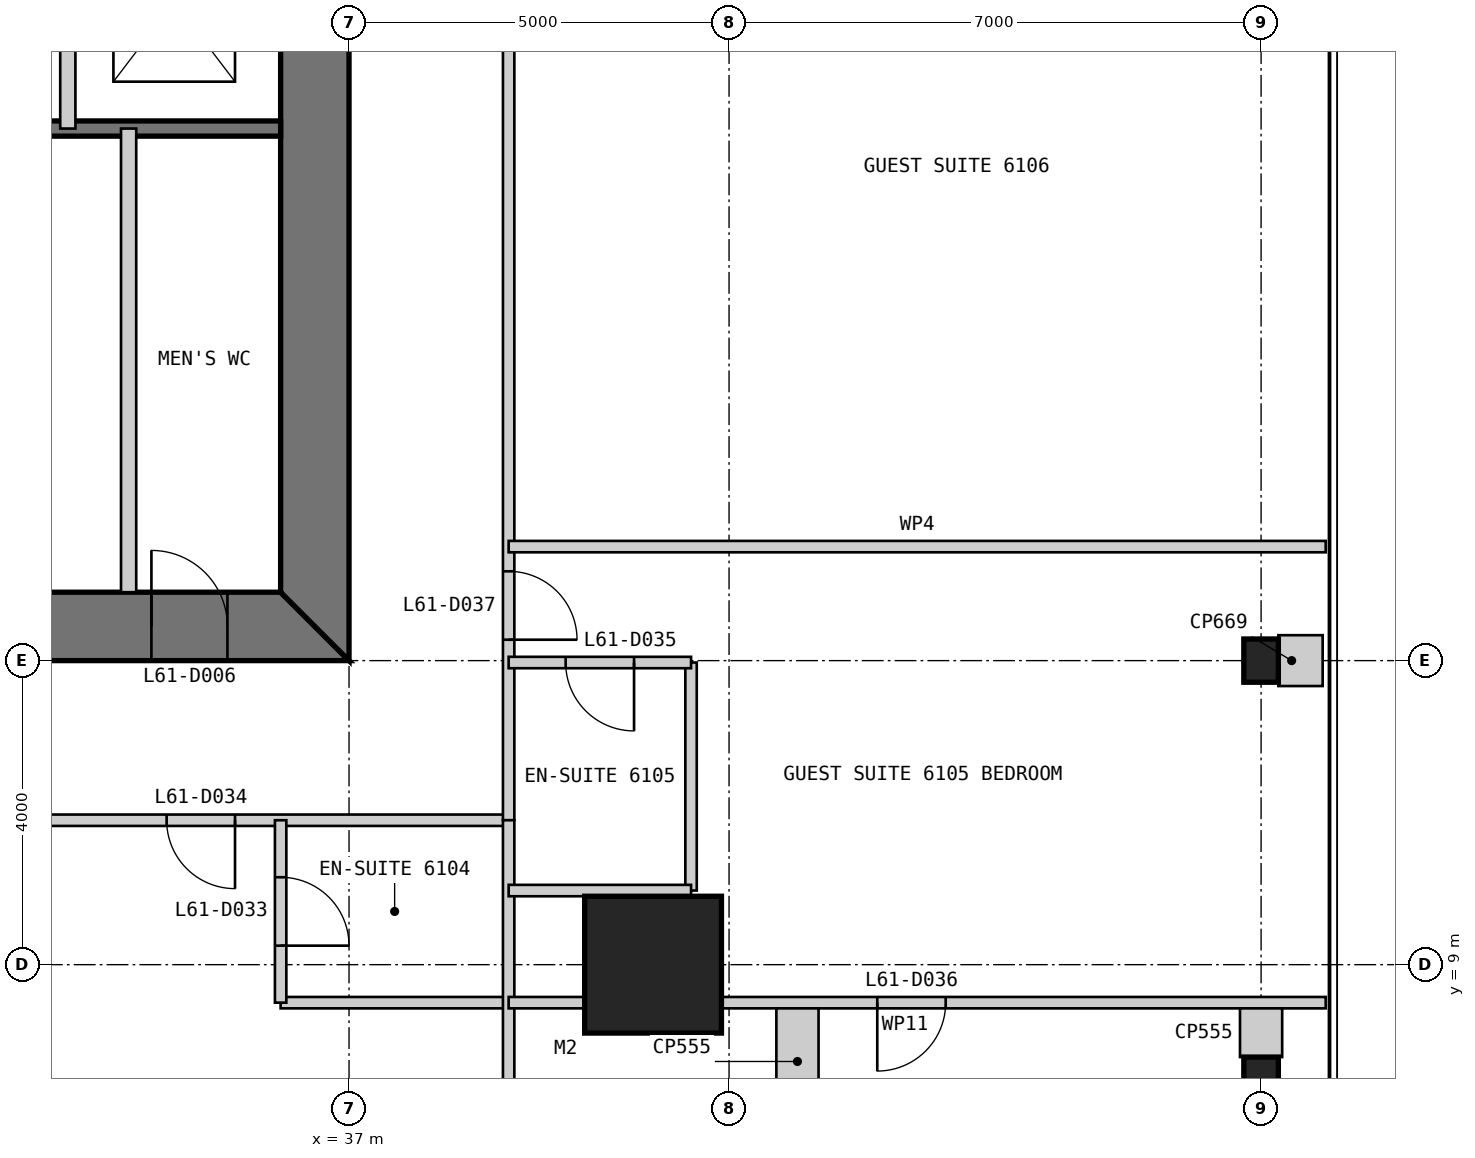
"""IFC4 building model, lengths in metres.
Left out: names, types, materials, properties, quantities, classifications, styles, units other than length and angle.
Written with IfcOpenShell. Run it as: python <this file> out.ifc"""

import sys

from ifc_helpers import new_model, si_unit, direction, frame, frame_2d, origin, origin_2d, place, context, subcontext, project, spatial, polyline, rectangle, i_section, outline, extrude, element, fill, save


model = new_model("IFC4")
c1 = context("Model", 3, precision=1e-05, world=origin(), true_north=direction((0.0, 1.0)))
c2 = subcontext(c1, "Body", "Model", "MODEL_VIEW")
j1 = project(units=[si_unit("LENGTHUNIT", "METRE"), si_unit("PLANEANGLEUNIT", "RADIAN")], contexts=[c1])
p1 = place(None, origin())
s1 = spatial("IfcSite", under=j1, at=p1, CompositionType="ELEMENT")
p2 = place(p1, origin())
s2 = spatial("IfcBuilding", under=s1, at=p2, CompositionType="ELEMENT")
p3 = place(p2, frame((0.0, 0.0, 259.4)))
s3 = spatial("IfcBuildingStorey", under=s2, at=p3, CompositionType="ELEMENT", Elevation=259.4)
p4 = place(p3, frame((41.0, 9.0, 0.0), z_axis=(0.0, 0.0, 1.0), x_axis=(1.0, 0.0, 0.0)))
e1 = element("IfcColumn", 1, at=p4, inside=s3, PredefinedType="COLUMN", context=c2, shape_type="SweptSolid", body=[
    extrude(rectangle(XDim=1.8, YDim=1.8, at=origin_2d()), origin(), (0.0, 0.0, 1.0), 3.4),
])
for number, where, z_axis, x_axis in (
    (2, (49.0, 7.5, 0.0), (0.0, 0.0, 1.0), (1.0, 0.0, 0.0)),
    (3, (49.0, 13.0, 0.0), (0.0, 0.0, 1.0), (1.0, 0.0, 0.0)),
):
    element("IfcColumn", number, at=place(p3, frame(where, z_axis=z_axis, x_axis=x_axis)), inside=s3, PredefinedType="COLUMN", context=c2, shape_type="SweptSolid", body=[
        extrude(i_section(OverallWidth=0.455, OverallDepth=0.569, WebThickness=0.078, FlangeThickness=0.125, at=origin_2d()), origin(), (0.0, 0.0, 1.0), 3.4),
    ])
p5 = place(p3, frame((13.0, 13.45, 0.0), z_axis=(0.0, 0.0, 1.0), x_axis=(1.0, 0.0, 0.0)))
e4 = element("IfcWall", 4, at=p5, inside=s3, PredefinedType="SHEAR", context=c2, shape_type="SweptSolid", body=[
    extrude(outline(polyline([(0.0, -0.45), (24.0, -0.45), (23.1, 0.45), (0.9, 0.45), (0.0, -0.45)])), origin(), (0.0, 0.0, 1.0), 3.4),
])
p6 = place(p5, frame((4.9, 0.0, 0.0)))
e5 = element("IfcOpeningElement", 5, at=p6, cuts=e4, PredefinedType="OPENING", context=c2, shape_type="SweptSolid", body=[
    extrude(rectangle(XDim=1.0, YDim=2.2, at=frame_2d((0.5, 1.1))), frame((0.0, 0.46, 0.0), z_axis=(0.0, -1.0, 0.0), x_axis=(1.0, 0.0, 0.0)), (0.0, 0.0, 1.0), 0.92),
])
p7 = place(p5, frame((8.9, 0.0, 0.0)))
e6 = element("IfcOpeningElement", 6, at=p7, cuts=e4, PredefinedType="OPENING", context=c2, shape_type="SweptSolid", body=[
    extrude(rectangle(XDim=1.1, YDim=2.2, at=frame_2d((0.55, 1.1))), frame((0.0, 0.46, 0.0), z_axis=(0.0, -1.0, 0.0), x_axis=(1.0, 0.0, 0.0)), (0.0, 0.0, 1.0), 0.92),
])
p8 = place(p5, frame((15.05, 0.0, 0.0)))
e7 = element("IfcOpeningElement", 7, at=p8, cuts=e4, PredefinedType="OPENING", context=c2, shape_type="SweptSolid", body=[
    extrude(rectangle(XDim=0.9, YDim=2.2, at=frame_2d((0.45, 1.1))), frame((0.0, 0.46, 0.0), z_axis=(0.0, -1.0, 0.0), x_axis=(1.0, 0.0, 0.0)), (0.0, 0.0, 1.0), 0.92),
])
p9 = place(p5, frame((17.9, 0.0, 0.0)))
e8 = element("IfcOpeningElement", 8, at=p9, cuts=e4, PredefinedType="OPENING", context=c2, shape_type="SweptSolid", body=[
    extrude(rectangle(XDim=1.0, YDim=2.2, at=frame_2d((0.5, 1.1))), frame((0.0, 0.46, 0.0), z_axis=(0.0, -1.0, 0.0), x_axis=(1.0, 0.0, 0.0)), (0.0, 0.0, 1.0), 0.92),
])
p10 = place(p5, frame((21.4, 0.0, 0.0)))
e9 = element("IfcOpeningElement", 9, at=p10, cuts=e4, PredefinedType="OPENING", context=c2, shape_type="SweptSolid", body=[
    extrude(rectangle(XDim=1.0, YDim=2.2, at=frame_2d((0.5, 1.1))), frame((0.0, 0.46, 0.0), z_axis=(0.0, -1.0, 0.0), x_axis=(1.0, 0.0, 0.0)), (0.0, 0.0, 1.0), 0.92),
])
p11 = place(p3, frame((36.55, 13.9, 0.0), z_axis=(0.0, 0.0, 1.0), x_axis=(0.0, 1.0, 0.0)))
e10 = element("IfcWall", 10, at=p11, inside=s3, PredefinedType="SHEAR", context=c2, shape_type="SweptSolid", body=[
    extrude(outline(polyline([(-0.9, -0.45), (23.1, -0.45), (22.2, 0.45), (0.0, 0.45), (-0.9, -0.45)])), origin(), (0.0, 0.0, 1.0), 3.4),
])
p12 = place(p11, frame((20.2, 0.0, 0.0)))
e11 = element("IfcOpeningElement", 11, at=p12, cuts=e10, PredefinedType="OPENING", context=c2, shape_type="SweptSolid", body=[
    extrude(rectangle(XDim=1.0, YDim=2.2, at=frame_2d((0.5, 1.1))), frame((0.0, 0.46, 0.0), z_axis=(0.0, -1.0, 0.0), x_axis=(1.0, 0.0, 0.0)), (0.0, 0.0, 1.0), 0.92),
])
p13 = place(p11, frame((17.25, 0.0, 0.0)))
e12 = element("IfcOpeningElement", 12, at=p13, cuts=e10, PredefinedType="OPENING", context=c2, shape_type="SweptSolid", body=[
    extrude(rectangle(XDim=0.9, YDim=2.2, at=frame_2d((0.45, 1.1))), frame((0.0, 0.46, 0.0), z_axis=(0.0, -1.0, 0.0), x_axis=(1.0, 0.0, 0.0)), (0.0, 0.0, 1.0), 0.92),
])
p14 = place(p3, frame((20.3, 20.0, 0.0), z_axis=(0.0, 0.0, 1.0), x_axis=(1.0, 0.0, 0.0)))
e13 = element("IfcWall", 13, at=p14, inside=s3, PredefinedType="SOLIDWALL", context=c2, shape_type="SweptSolid", body=[
    extrude(rectangle(XDim=15.8, YDim=0.2, at=frame_2d((7.9, 0.0))), origin(), (0.0, 0.0, 1.0), 3.2),
])
p15 = place(p3, frame((34.1, 13.9, 0.0), z_axis=(0.0, 0.0, 1.0), x_axis=(0.0, 1.0, 0.0)))
e14 = element("IfcWall", 14, at=p15, inside=s3, PredefinedType="PARTITIONING", context=c2, shape_type="SweptSolid", body=[
    extrude(rectangle(XDim=6.1, YDim=0.2, at=frame_2d((3.05, 0.0))), origin(), (0.0, 0.0, 1.0), 3.2),
])
p16 = place(p3, frame((33.3, 36.1, 0.0), z_axis=(0.0, 0.0, 1.0), x_axis=(0.0, -1.0, 0.0)))
e15 = element("IfcWall", 15, at=p16, inside=s3, PredefinedType="PARTITIONING", context=c2, shape_type="SweptSolid", body=[
    extrude(rectangle(XDim=16.1, YDim=0.2, at=frame_2d((8.05, 0.0))), origin(), (0.0, 0.0, 1.0), 3.2),
])
p17 = place(p16, frame((4.1, 0.0, 0.0)))
e16 = element("IfcOpeningElement", 16, at=p17, cuts=e15, PredefinedType="OPENING", context=c2, shape_type="SweptSolid", body=[
    extrude(rectangle(XDim=0.9, YDim=2.2, at=frame_2d((0.45, 1.1))), frame((0.0, 0.11, 0.0), z_axis=(0.0, -1.0, 0.0), x_axis=(1.0, 0.0, 0.0)), (0.0, 0.0, 1.0), 0.22),
])
p18 = place(p16, frame((7.217, 0.0, 0.0)))
e17 = element("IfcOpeningElement", 17, at=p18, cuts=e15, PredefinedType="OPENING", context=c2, shape_type="SweptSolid", body=[
    extrude(rectangle(XDim=1.1, YDim=2.2, at=frame_2d((0.55, 1.1))), frame((0.0, 0.11, 0.0), z_axis=(0.0, -1.0, 0.0), x_axis=(1.0, 0.0, 0.0)), (0.0, 0.0, 1.0), 0.22),
])
p19 = place(p16, frame((10.55, 0.0, 0.0)))
e18 = element("IfcOpeningElement", 18, at=p19, cuts=e15, PredefinedType="OPENING", context=c2, shape_type="SweptSolid", body=[
    extrude(rectangle(XDim=1.1, YDim=2.2, at=frame_2d((0.55, 1.1))), frame((0.0, 0.11, 0.0), z_axis=(0.0, -1.0, 0.0), x_axis=(1.0, 0.0, 0.0)), (0.0, 0.0, 1.0), 0.22),
])
p20 = place(p16, frame((13.883, 0.0, 0.0)))
e19 = element("IfcOpeningElement", 19, at=p20, cuts=e15, PredefinedType="OPENING", context=c2, shape_type="SweptSolid", body=[
    extrude(rectangle(XDim=1.1, YDim=2.2, at=frame_2d((0.55, 1.1))), frame((0.0, 0.11, 0.0), z_axis=(0.0, -1.0, 0.0), x_axis=(1.0, 0.0, 0.0)), (0.0, 0.0, 1.0), 0.22),
])
p21 = place(p3, frame((10.9, 10.9, 0.0), z_axis=(0.0, 0.0, 1.0), x_axis=(1.0, 0.0, 0.0)))
e20 = element("IfcWall", 20, at=p21, inside=s3, PredefinedType="PARTITIONING", context=c2, shape_type="SweptSolid", body=[
    extrude(rectangle(XDim=28.2, YDim=0.15, at=frame_2d((14.1, 0.0))), origin(), (0.0, 0.0, 1.0), 3.25),
])
p22 = place(p21, frame((2.375, 0.0, 0.0)))
e21 = element("IfcOpeningElement", 21, at=p22, cuts=e20, PredefinedType="OPENING", context=c2, shape_type="SweptSolid", body=[
    extrude(rectangle(XDim=0.9, YDim=2.1, at=frame_2d((0.45, 1.05))), frame((0.0, 0.085, 0.0), z_axis=(0.0, -1.0, 0.0), x_axis=(1.0, 0.0, 0.0)), (0.0, 0.0, 1.0), 0.17),
])
p23 = place(p21, frame((10.7, 0.0, 0.0)))
e22 = element("IfcOpeningElement", 22, at=p23, cuts=e20, PredefinedType="OPENING", context=c2, shape_type="SweptSolid", body=[
    extrude(rectangle(XDim=0.9, YDim=2.1, at=frame_2d((0.45, 1.05))), frame((0.0, 0.085, 0.0), z_axis=(0.0, -1.0, 0.0), x_axis=(1.0, 0.0, 0.0)), (0.0, 0.0, 1.0), 0.17),
])
p24 = place(p21, frame((16.8, 0.0, 0.0)))
e23 = element("IfcOpeningElement", 23, at=p24, cuts=e20, PredefinedType="OPENING", context=c2, shape_type="SweptSolid", body=[
    extrude(rectangle(XDim=1.0, YDim=2.1, at=frame_2d((0.5, 1.05))), frame((0.0, 0.085, 0.0), z_axis=(0.0, -1.0, 0.0), x_axis=(1.0, 0.0, 0.0)), (0.0, 0.0, 1.0), 0.17),
])
p25 = place(p21, frame((23.7, 0.0, 0.0)))
e24 = element("IfcOpeningElement", 24, at=p25, cuts=e20, PredefinedType="OPENING", context=c2, shape_type="SweptSolid", body=[
    extrude(rectangle(XDim=0.9, YDim=2.1, at=frame_2d((0.45, 1.05))), frame((0.0, 0.085, 0.0), z_axis=(0.0, -1.0, 0.0), x_axis=(1.0, 0.0, 0.0)), (0.0, 0.0, 1.0), 0.17),
])
p26 = place(p3, frame((36.1, 8.5, 0.0), z_axis=(0.0, 0.0, 1.0), x_axis=(1.0, 0.0, 0.0)))
e25 = element("IfcWall", 25, at=p26, inside=s3, PredefinedType="PARTITIONING", context=c2, shape_type="SweptSolid", body=[
    extrude(rectangle(XDim=3.0, YDim=0.15, at=frame_2d((1.5, 0.0))), origin(), (0.0, 0.0, 1.0), 3.25),
])
p27 = place(p3, frame((36.1, 8.5, 0.0), z_axis=(0.0, 0.0, 1.0), x_axis=(0.0, 1.0, 0.0)))
e26 = element("IfcWall", 26, at=p27, inside=s3, PredefinedType="PARTITIONING", context=c2, shape_type="SweptSolid", body=[
    extrude(rectangle(XDim=2.4, YDim=0.15, at=frame_2d((1.2, 0.0))), origin(), (0.0, 0.0, 1.0), 3.25),
])
p28 = place(p27, frame((0.75, 0.0, 0.0)))
e27 = element("IfcOpeningElement", 27, at=p28, cuts=e26, PredefinedType="OPENING", context=c2, shape_type="SweptSolid", body=[
    extrude(rectangle(XDim=0.9, YDim=2.1, at=frame_2d((0.45, 1.05))), frame((0.0, 0.085, 0.0), z_axis=(0.0, -1.0, 0.0), x_axis=(1.0, 0.0, 0.0)), (0.0, 0.0, 1.0), 0.17),
])
p29 = place(p3, frame((39.1, 10.9, 0.0), z_axis=(0.0, 0.0, 1.0), x_axis=(0.0, 1.0, 0.0)))
e28 = element("IfcWall", 28, at=p29, inside=s3, PredefinedType="PARTITIONING", context=c2, shape_type="SweptSolid", body=[
    extrude(rectangle(XDim=28.2, YDim=0.15, at=frame_2d((14.1, 0.0))), origin(), (0.0, 0.0, 1.0), 3.25),
])
p30 = place(p29, frame((2.375, 0.0, 0.0)))
e29 = element("IfcOpeningElement", 29, at=p30, cuts=e28, PredefinedType="OPENING", context=c2, shape_type="SweptSolid", body=[
    extrude(rectangle(XDim=0.9, YDim=2.1, at=frame_2d((0.45, 1.05))), frame((0.0, 0.085, 0.0), z_axis=(0.0, -1.0, 0.0), x_axis=(1.0, 0.0, 0.0)), (0.0, 0.0, 1.0), 0.17),
])
p31 = place(p29, frame((10.7, 0.0, 0.0)))
e30 = element("IfcOpeningElement", 30, at=p31, cuts=e28, PredefinedType="OPENING", context=c2, shape_type="SweptSolid", body=[
    extrude(rectangle(XDim=0.9, YDim=2.1, at=frame_2d((0.45, 1.05))), frame((0.0, 0.085, 0.0), z_axis=(0.0, -1.0, 0.0), x_axis=(1.0, 0.0, 0.0)), (0.0, 0.0, 1.0), 0.17),
])
p32 = place(p29, frame((17.1, 0.0, 0.0)))
e31 = element("IfcOpeningElement", 31, at=p32, cuts=e28, PredefinedType="OPENING", context=c2, shape_type="SweptSolid", body=[
    extrude(rectangle(XDim=0.9, YDim=2.1, at=frame_2d((0.45, 1.05))), frame((0.0, 0.085, 0.0), z_axis=(0.0, -1.0, 0.0), x_axis=(1.0, 0.0, 0.0)), (0.0, 0.0, 1.0), 0.17),
])
p33 = place(p29, frame((23.7, 0.0, 0.0)))
e32 = element("IfcOpeningElement", 32, at=p33, cuts=e28, PredefinedType="OPENING", context=c2, shape_type="SweptSolid", body=[
    extrude(rectangle(XDim=0.9, YDim=2.1, at=frame_2d((0.45, 1.05))), frame((0.0, 0.085, 0.0), z_axis=(0.0, -1.0, 0.0), x_axis=(1.0, 0.0, 0.0)), (0.0, 0.0, 1.0), 0.17),
])
p34 = place(p3, frame((39.1, 0.15, 0.0), z_axis=(0.0, 0.0, 1.0), x_axis=(0.0, 1.0, 0.0)))
e33 = element("IfcWall", 33, at=p34, inside=s3, PredefinedType="PARTITIONING", context=c2, shape_type="SweptSolid", body=[
    extrude(rectangle(XDim=10.75, YDim=0.15, at=frame_2d((5.375, 0.0))), origin(), (0.0, 0.0, 1.0), 3.25),
])
p35 = place(p3, frame((41.5, 9.975, 0.0), z_axis=(0.0, 0.0, 1.0), x_axis=(0.0, 1.0, 0.0)))
e34 = element("IfcWall", 34, at=p35, inside=s3, PredefinedType="PARTITIONING", context=c2, shape_type="SweptSolid", body=[
    extrude(rectangle(XDim=3.0, YDim=0.15, at=frame_2d((1.5, 0.0))), origin(), (0.0, 0.0, 1.0), 3.25),
])
p36 = place(p3, frame((41.5, 12.975, 0.0), z_axis=(0.0, 0.0, 1.0), x_axis=(-1.0, 0.0, 0.0)))
e35 = element("IfcWall", 35, at=p36, inside=s3, PredefinedType="PARTITIONING", context=c2, shape_type="SweptSolid", body=[
    extrude(rectangle(XDim=2.4, YDim=0.15, at=frame_2d((1.2, 0.0))), origin(), (0.0, 0.0, 1.0), 2.404),
])
p37 = place(p36, frame((0.75, 0.0, 0.0)))
e36 = element("IfcOpeningElement", 36, at=p37, cuts=e35, PredefinedType="OPENING", context=c2, shape_type="SweptSolid", body=[
    extrude(rectangle(XDim=0.9, YDim=2.1, at=frame_2d((0.45, 1.05))), frame((0.0, 0.085, 0.0), z_axis=(0.0, -1.0, 0.0), x_axis=(1.0, 0.0, 0.0)), (0.0, 0.0, 1.0), 0.17),
])
p38 = place(p3, frame((41.5, 9.975, 0.0), z_axis=(0.0, 0.0, 1.0), x_axis=(-1.0, 0.0, 0.0)))
e37 = element("IfcWall", 37, at=p38, inside=s3, PredefinedType="PARTITIONING", context=c2, shape_type="SweptSolid", body=[
    extrude(rectangle(XDim=2.4, YDim=0.15, at=frame_2d((1.2, 0.0))), origin(), (0.0, 0.0, 1.0), 3.25),
])
p39 = place(p3, frame((49.85, 8.5, 0.0), z_axis=(0.0, 0.0, 1.0), x_axis=(-1.0, 0.0, 0.0)))
e38 = element("IfcWall", 38, at=p39, inside=s3, PredefinedType="PARTITIONING", context=c2, shape_type="SweptSolid", body=[
    extrude(rectangle(XDim=10.75, YDim=0.15, at=frame_2d((5.375, 0.0))), origin(), (0.0, 0.0, 1.0), 3.25),
])
p40 = place(p39, frame((5.0, 0.0, 0.0)))
e39 = element("IfcOpeningElement", 39, at=p40, cuts=e38, PredefinedType="OPENING", context=c2, shape_type="SweptSolid", body=[
    extrude(rectangle(XDim=0.9, YDim=2.1, at=frame_2d((0.45, 1.05))), frame((0.0, 0.085, 0.0), z_axis=(0.0, -1.0, 0.0), x_axis=(1.0, 0.0, 0.0)), (0.0, 0.0, 1.0), 0.17),
])
p41 = place(p3, frame((49.85, 14.5, 0.0), z_axis=(0.0, 0.0, 1.0), x_axis=(-1.0, 0.0, 0.0)))
e40 = element("IfcWall", 40, at=p41, inside=s3, PredefinedType="PARTITIONING", context=c2, shape_type="SweptSolid", body=[
    extrude(rectangle(XDim=10.75, YDim=0.15, at=frame_2d((5.375, 0.0))), origin(), (0.0, 0.0, 1.0), 3.25),
])
p42 = place(p3, frame((42.9, 8.425, 0.0), z_axis=(0.0, 0.0, 1.0), x_axis=(0.0, -1.0, 0.0)))
e41 = element("IfcWall", 41, at=p42, inside=s3, PredefinedType="PARTITIONING", context=c2, shape_type="SweptSolid", body=[
    extrude(rectangle(XDim=1.041, YDim=0.555, at=frame_2d((0.52, 0.0))), origin(), (0.0, 0.0, 1.0), 3.25),
])
p43 = place(p3, frame((49.0, 8.425, 0.0), z_axis=(0.0, 0.0, 1.0), x_axis=(0.0, -1.0, 0.0)))
e42 = element("IfcWall", 42, at=p43, inside=s3, PredefinedType="PARTITIONING", context=c2, shape_type="SweptSolid", body=[
    extrude(rectangle(XDim=0.641, YDim=0.555, at=frame_2d((0.32, 0.0))), origin(), (0.0, 0.0, 1.0), 2.338),
])
p44 = place(p3, frame((49.81, 13.0, 0.0), z_axis=(0.0, 0.0, 1.0), x_axis=(-1.0, 0.0, 0.0)))
e43 = element("IfcWall", 43, at=p44, inside=s3, PredefinedType="PARTITIONING", context=c2, shape_type="SweptSolid", body=[
    extrude(rectangle(XDim=0.583, YDim=0.669, at=frame_2d((0.292, 0.0))), origin(), (0.0, 0.0, 1.0), 3.25),
])
p45 = place(p10, origin())
e44 = element("IfcDoor", 44, at=p45, inside=s3, OperationType="SINGLE_SWING_LEFT", PredefinedType="DOOR", context=c2, shape_type="SweptSolid", body=[
    extrude(rectangle(XDim=1.0, YDim=2.2, at=frame_2d((0.5, 1.1))), frame((0.0, 0.025, 0.0), z_axis=(0.0, -1.0, 0.0), x_axis=(1.0, 0.0, 0.0)), (0.0, 0.0, 1.0), 0.05),
    extrude(outline(polyline([(0.0, 0.0), (0.04, 0.0), (0.04, 2.16), (0.96, 2.16), (0.96, 0.0), (1.0, 0.0), (1.0, 2.2), (0.0, 2.2), (0.0, 0.0)])), frame((0.0, 0.3, 0.0), z_axis=(0.0, -1.0, 0.0), x_axis=(1.0, 0.0, 0.0)), (0.0, 0.0, 1.0), 0.6),
])
fill(e9, e44)
p46 = place(p28, frame((0.9, 0.0, 0.0), z_axis=(0.0, 0.0, 1.0), x_axis=(-1.0, 0.0, 0.0)))
e45 = element("IfcDoor", 45, at=p46, inside=s3, OperationType="SINGLE_SWING_RIGHT", PredefinedType="DOOR", context=c2, shape_type="SweptSolid", body=[
    extrude(rectangle(XDim=0.9, YDim=2.1, at=frame_2d((0.45, 1.05))), frame((0.0, 0.025, 0.0), z_axis=(0.0, -1.0, 0.0), x_axis=(1.0, 0.0, 0.0)), (0.0, 0.0, 1.0), 0.05),
])
fill(e27, e45)
p47 = place(p25, frame((0.9, 0.0, 0.0), z_axis=(0.0, 0.0, 1.0), x_axis=(-1.0, 0.0, 0.0)))
e46 = element("IfcDoor", 46, at=p47, inside=s3, OperationType="SINGLE_SWING_LEFT", PredefinedType="DOOR", context=c2, shape_type="SweptSolid", body=[
    extrude(rectangle(XDim=0.9, YDim=2.1, at=frame_2d((0.45, 1.05))), frame((0.0, 0.025, 0.0), z_axis=(0.0, -1.0, 0.0), x_axis=(1.0, 0.0, 0.0)), (0.0, 0.0, 1.0), 0.05),
])
fill(e24, e46)
p48 = place(p37, origin())
e47 = element("IfcDoor", 47, at=p48, inside=s3, OperationType="SINGLE_SWING_LEFT", PredefinedType="DOOR", context=c2, shape_type="SweptSolid", body=[
    extrude(rectangle(XDim=0.9, YDim=2.1, at=frame_2d((0.45, 1.05))), frame((0.0, 0.025, 0.0), z_axis=(0.0, -1.0, 0.0), x_axis=(1.0, 0.0, 0.0)), (0.0, 0.0, 1.0), 0.05),
])
fill(e36, e47)
p49 = place(p40, origin())
e48 = element("IfcDoor", 48, at=p49, inside=s3, OperationType="SINGLE_SWING_RIGHT", PredefinedType="DOOR", context=c2, shape_type="SweptSolid", body=[
    extrude(rectangle(XDim=0.9, YDim=2.1, at=frame_2d((0.45, 1.05))), frame((0.0, 0.025, 0.0), z_axis=(0.0, -1.0, 0.0), x_axis=(1.0, 0.0, 0.0)), (0.0, 0.0, 1.0), 0.05),
])
fill(e39, e48)
p50 = place(p30, frame((0.9, 0.0, 0.0), z_axis=(0.0, 0.0, 1.0), x_axis=(-1.0, 0.0, 0.0)))
e49 = element("IfcDoor", 49, at=p50, inside=s3, OperationType="SINGLE_SWING_RIGHT", PredefinedType="DOOR", context=c2, shape_type="SweptSolid", body=[
    extrude(rectangle(XDim=0.9, YDim=2.1, at=frame_2d((0.45, 1.05))), frame((0.0, 0.025, 0.0), z_axis=(0.0, -1.0, 0.0), x_axis=(1.0, 0.0, 0.0)), (0.0, 0.0, 1.0), 0.05),
])
fill(e29, e49)
save(model, sys.argv[1])
